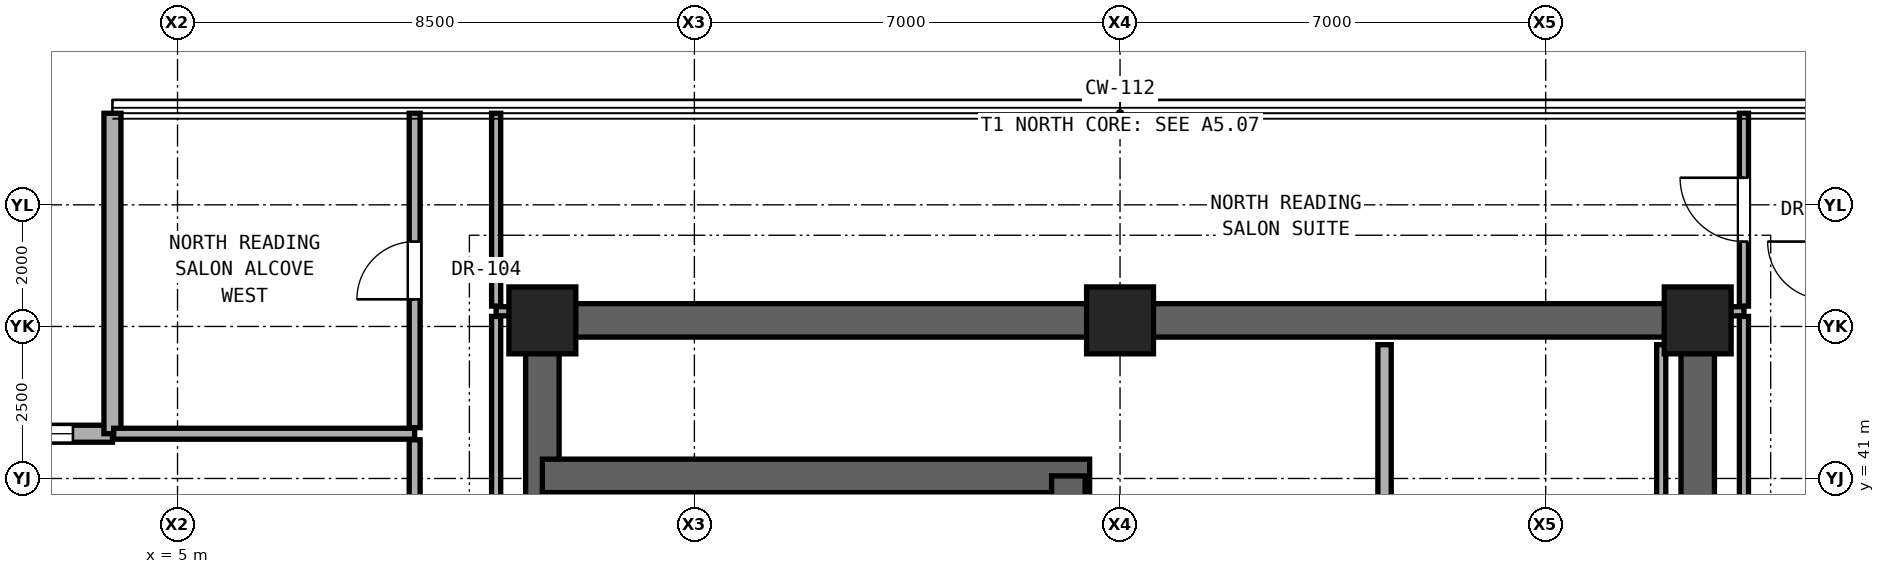
"""IFC4 building model, lengths in metres.
Left out: names, types, materials, properties, quantities, classifications, styles, units other than length and angle.
Written with IfcOpenShell. Run it as: python <this file> out.ifc"""

import sys

from ifc_helpers import new_model, si_unit, direction, frame, frame_2d, origin, origin_2d, place, context, subcontext, project, spatial, rectangle, extrude, element, fill, save


model = new_model("IFC4")
c1 = context("Model", 3, precision=1e-05, world=origin(), true_north=direction((0.0, 1.0)))
c2 = subcontext(c1, "Body", "Model", "MODEL_VIEW")
j1 = project(units=[si_unit("LENGTHUNIT", "METRE"), si_unit("PLANEANGLEUNIT", "RADIAN")], contexts=[c1])
p1 = place(None, origin())
s1 = spatial("IfcSite", under=j1, at=p1, CompositionType="ELEMENT")
p2 = place(p1, origin())
s2 = spatial("IfcBuilding", under=s1, at=p2, CompositionType="ELEMENT")
p3 = place(p2, frame((0.0, 0.0, 141.2)))
s3 = spatial("IfcBuildingStorey", under=s2, at=p3, CompositionType="ELEMENT", Elevation=141.2)
for number, where, z_axis, x_axis in (
    (1, (11.0, 43.6, 0.0), (0.0, 0.0, 1.0), (1.0, 0.0, 0.0)),
    (2, (20.5, 43.6, 0.0), (0.0, 0.0, 1.0), (1.0, 0.0, 0.0)),
    (3, (30.0, 43.6, 0.0), (0.0, 0.0, 1.0), (1.0, 0.0, 0.0)),
):
    element("IfcColumn", number, at=place(p3, frame(where, z_axis=z_axis, x_axis=x_axis)), inside=s3, PredefinedType="COLUMN", context=c2, shape_type="SweptSolid", body=[
        extrude(rectangle(XDim=1.1, YDim=1.1, at=origin_2d()), origin(), (0.0, 0.0, 1.0), 3.3),
    ])
p4 = place(p3, frame((11.0, 43.6, 0.0), z_axis=(0.0, 0.0, 1.0), x_axis=(1.0, 0.0, 0.0)))
e4 = element("IfcWall", 4, at=p4, inside=s3, PredefinedType="SHEAR", context=c2, shape_type="SweptSolid", body=[
    extrude(rectangle(XDim=19.0, YDim=0.55, at=frame_2d((9.5, 0.0))), origin(), (0.0, 0.0, 1.0), 3.08),
])
for number, where, z_axis, x_axis in (
    (5, (11.0, 37.6, 0.0), (0.0, 0.0, 1.0), (0.0, 1.0, 0.0)),
    (6, (30.0, 37.6, 0.0), (0.0, 0.0, 1.0), (0.0, 1.0, 0.0)),
):
    element("IfcWall", number, at=place(p3, frame(where, z_axis=z_axis, x_axis=x_axis)), inside=s3, PredefinedType="SHEAR", context=c2, shape_type="SweptSolid", body=[
        extrude(rectangle(XDim=6.0, YDim=0.55, at=frame_2d((3.0, 0.0))), origin(), (0.0, 0.0, 1.0), 3.08),
    ])
p5 = place(p3, frame((11.0, 41.043, 0.0), z_axis=(0.0, 0.0, 1.0), x_axis=(1.0, 0.0, 0.0)))
e7 = element("IfcWall", 7, at=p5, inside=s3, PredefinedType="SHEAR", context=c2, shape_type="SweptSolid", body=[
    extrude(rectangle(XDim=9.0, YDim=0.55, at=frame_2d((4.5, 0.0))), origin(), (0.0, 0.0, 1.0), 3.08),
])
p6 = place(p3, frame((19.65, 37.6, 0.0), z_axis=(0.0, 0.0, 1.0), x_axis=(0.0, 1.0, 0.0)))
e8 = element("IfcWall", 8, at=p6, inside=s3, PredefinedType="SHEAR", context=c2, shape_type="SweptSolid", body=[
    extrude(rectangle(XDim=3.443, YDim=0.55, at=frame_2d((1.721, 0.0))), origin(), (0.0, 0.0, 1.0), 3.08),
])
p7 = place(p3, frame((3.93, 41.736, 0.0), z_axis=(0.0, 0.0, 1.0), x_axis=(-1.0, 0.0, 0.0)))
e9 = element("IfcWall", 9, at=p7, inside=s3, PredefinedType="SOLIDWALL", context=c2, shape_type="SweptSolid", body=[
    extrude(rectangle(XDim=5.27, YDim=0.28, at=frame_2d((2.635, 0.0))), origin(), (0.0, 0.0, 1.0), 3.06),
])
p8 = place(p7, frame((0.65, 0.0, 0.85)))
e10 = element("IfcOpeningElement", 10, at=p8, cuts=e9, PredefinedType="OPENING", context=c2, shape_type="SweptSolid", body=[
    extrude(rectangle(XDim=1.1, YDim=2.0, at=frame_2d((0.55, 1.0))), frame((0.0, 0.15, 0.0), z_axis=(0.0, -1.0, 0.0), x_axis=(1.0, 0.0, 0.0)), (0.0, 0.0, 1.0), 0.3),
])
p9 = place(p3, frame((3.93, 47.006, 0.0), z_axis=(0.0, 0.0, 1.0), x_axis=(0.0, -1.0, 0.0)))
e11 = element("IfcWall", 11, at=p9, inside=s3, PredefinedType="SOLIDWALL", context=c2, shape_type="SweptSolid", body=[
    extrude(rectangle(XDim=5.27, YDim=0.28, at=frame_2d((2.635, 0.0))), origin(), (0.0, 0.0, 1.0), 3.06),
])
p10 = place(p3, frame((3.95, 41.736, 0.0), z_axis=(0.0, 0.0, 1.0), x_axis=(1.0, 0.0, 0.0)))
e12 = element("IfcWall", 12, at=p10, inside=s3, PredefinedType="PARTITIONING", context=c2, shape_type="SweptSolid", body=[
    extrude(rectangle(XDim=4.95, YDim=0.18, at=frame_2d((2.475, 0.0))), origin(), (0.0, 0.0, 1.0), 3.08),
])
for number, where, z_axis, x_axis in (
    (13, (10.24, 43.75, 0.0), (0.0, 0.0, 1.0), (1.0, 0.0, 0.0)),
    (14, (30.27, 43.75, 0.0), (0.0, 0.0, 1.0), (1.0, 0.0, 0.0)),
):
    element("IfcWall", number, at=place(p3, frame(where, z_axis=z_axis, x_axis=x_axis)), inside=s3, PredefinedType="PARTITIONING", context=c2, shape_type="SweptSolid", body=[
        extrude(rectangle(XDim=0.49, YDim=0.15, at=frame_2d((0.245, 0.0))), origin(), (0.0, 0.0, 1.0), 3.08),
    ])
p11 = place(p3, frame((8.9, 37.338, 0.0), z_axis=(0.0, 0.0, 1.0), x_axis=(0.0, 1.0, 0.0)))
e15 = element("IfcWall", 15, at=p11, inside=s3, PredefinedType="PARTITIONING", context=c2, shape_type="SweptSolid", body=[
    extrude(rectangle(XDim=4.298, YDim=0.18, at=frame_2d((2.149, 0.0))), origin(), (0.0, 0.0, 1.0), 2.456),
])
p12 = place(p11, frame((1.024, 0.0, 0.0)))
e16 = element("IfcOpeningElement", 16, at=p12, cuts=e15, PredefinedType="OPENING", context=c2, shape_type="SweptSolid", body=[
    extrude(rectangle(XDim=1.05, YDim=2.2, at=frame_2d((0.525, 1.1))), frame((0.0, 0.1, 0.0), z_axis=(0.0, -1.0, 0.0), x_axis=(1.0, 0.0, 0.0)), (0.0, 0.0, 1.0), 0.2),
])
p13 = place(p3, frame((8.9, 41.836, 0.0), z_axis=(0.0, 0.0, 1.0), x_axis=(0.0, 1.0, 0.0)))
e17 = element("IfcWall", 17, at=p13, inside=s3, PredefinedType="PARTITIONING", context=c2, shape_type="SweptSolid", body=[
    extrude(rectangle(XDim=5.17, YDim=0.18, at=frame_2d((2.585, 0.0))), origin(), (0.0, 0.0, 1.0), 3.08),
])
p14 = place(p13, frame((2.11, 0.0, 0.0)))
e18 = element("IfcOpeningElement", 18, at=p14, cuts=e17, PredefinedType="OPENING", context=c2, shape_type="SweptSolid", body=[
    extrude(rectangle(XDim=0.95, YDim=2.15, at=frame_2d((0.475, 1.075))), frame((0.0, 0.1, 0.0), z_axis=(0.0, -1.0, 0.0), x_axis=(1.0, 0.0, 0.0)), (0.0, 0.0, 1.0), 0.2),
])
p15 = place(p3, frame((10.24, 34.535, 0.0), z_axis=(0.0, 0.0, 1.0), x_axis=(0.0, 1.0, 0.0)))
e19 = element("IfcWall", 19, at=p15, inside=s3, PredefinedType="PARTITIONING", context=c2, shape_type="SweptSolid", body=[
    extrude(rectangle(XDim=9.13, YDim=0.15, at=frame_2d((4.565, 0.0))), origin(), (0.0, 0.0, 1.0), 2.456),
])
p16 = place(p3, frame((10.24, 43.835, 0.0), z_axis=(0.0, 0.0, 1.0), x_axis=(0.0, 1.0, 0.0)))
e20 = element("IfcWall", 20, at=p16, inside=s3, PredefinedType="PARTITIONING", context=c2, shape_type="SweptSolid", body=[
    extrude(rectangle(XDim=3.171, YDim=0.15, at=frame_2d((1.585, 0.0))), origin(), (0.0, 0.0, 1.0), 3.08),
])
p17 = place(p3, frame((24.85, 40.26, 0.0), z_axis=(0.0, 0.0, 1.0), x_axis=(0.0, 1.0, 0.0)))
e21 = element("IfcWall", 21, at=p17, inside=s3, PredefinedType="SOLIDWALL", context=c2, shape_type="SweptSolid", body=[
    extrude(rectangle(XDim=2.94, YDim=0.22, at=frame_2d((1.47, 0.0))), origin(), (0.0, 0.0, 1.0), 3.08),
])
p18 = place(p3, frame((29.4, 37.87, 0.0), z_axis=(0.0, 0.0, 1.0), x_axis=(0.0, 1.0, 0.0)))
e22 = element("IfcWall", 22, at=p18, inside=s3, PredefinedType="PARTITIONING", context=c2, shape_type="SweptSolid", body=[
    extrude(rectangle(XDim=5.33, YDim=0.15, at=frame_2d((2.665, 0.0))), origin(), (0.0, 0.0, 1.0), 3.08),
])
p19 = place(p3, frame((30.76, 34.57, 0.0), z_axis=(0.0, 0.0, 1.0), x_axis=(0.0, 1.0, 0.0)))
e23 = element("IfcWall", 23, at=p19, inside=s3, PredefinedType="PARTITIONING", context=c2, shape_type="SweptSolid", body=[
    extrude(rectangle(XDim=9.095, YDim=0.15, at=frame_2d((4.547, 0.0))), origin(), (0.0, 0.0, 1.0), 2.456),
])
p20 = place(p3, frame((30.76, 43.835, 0.0), z_axis=(0.0, 0.0, 1.0), x_axis=(0.0, 1.0, 0.0)))
e24 = element("IfcWall", 24, at=p20, inside=s3, PredefinedType="PARTITIONING", context=c2, shape_type="SweptSolid", body=[
    extrude(rectangle(XDim=3.171, YDim=0.15, at=frame_2d((1.585, 0.0))), origin(), (0.0, 0.0, 1.0), 3.08),
])
p21 = place(p20, frame((1.061, 0.0, 0.0)))
e25 = element("IfcOpeningElement", 25, at=p21, cuts=e24, PredefinedType="OPENING", context=c2, shape_type="SweptSolid", body=[
    extrude(rectangle(XDim=1.05, YDim=2.2, at=frame_2d((0.525, 1.1))), frame((0.0, 0.085, 0.0), z_axis=(0.0, -1.0, 0.0), x_axis=(1.0, 0.0, 0.0)), (0.0, 0.0, 1.0), 0.17),
])
p22 = place(p8, origin())
e26 = element("IfcWindow", 26, at=p22, inside=s3, PartitioningType="SINGLE_PANEL", PredefinedType="WINDOW", context=c2, shape_type="SweptSolid", body=[
    extrude(rectangle(XDim=1.1, YDim=2.0, at=frame_2d((0.55, 1.0))), frame((0.0, 0.03, 0.0), z_axis=(0.0, -1.0, 0.0), x_axis=(1.0, 0.0, 0.0)), (0.0, 0.0, 1.0), 0.06),
])
fill(e10, e26)
p23 = place(p21, origin())
e27 = element("IfcDoor", 27, at=p23, inside=s3, OperationType="SINGLE_SWING_RIGHT", PredefinedType="DOOR", context=c2, shape_type="SweptSolid", body=[
    extrude(rectangle(XDim=1.05, YDim=2.2, at=frame_2d((0.525, 1.1))), frame((0.0, 0.025, 0.0), z_axis=(0.0, -1.0, 0.0), x_axis=(1.0, 0.0, 0.0)), (0.0, 0.0, 1.0), 0.05),
])
fill(e25, e27)
p24 = place(p14, origin())
e28 = element("IfcDoor", 28, at=p24, inside=s3, OperationType="SINGLE_SWING_LEFT", PredefinedType="DOOR", context=c2, shape_type="SweptSolid", body=[
    extrude(rectangle(XDim=0.95, YDim=2.15, at=frame_2d((0.475, 1.075))), frame((0.0, 0.025, 0.0), z_axis=(0.0, -1.0, 0.0), x_axis=(1.0, 0.0, 0.0)), (0.0, 0.0, 1.0), 0.05),
])
fill(e18, e28)
save(model, sys.argv[1])
